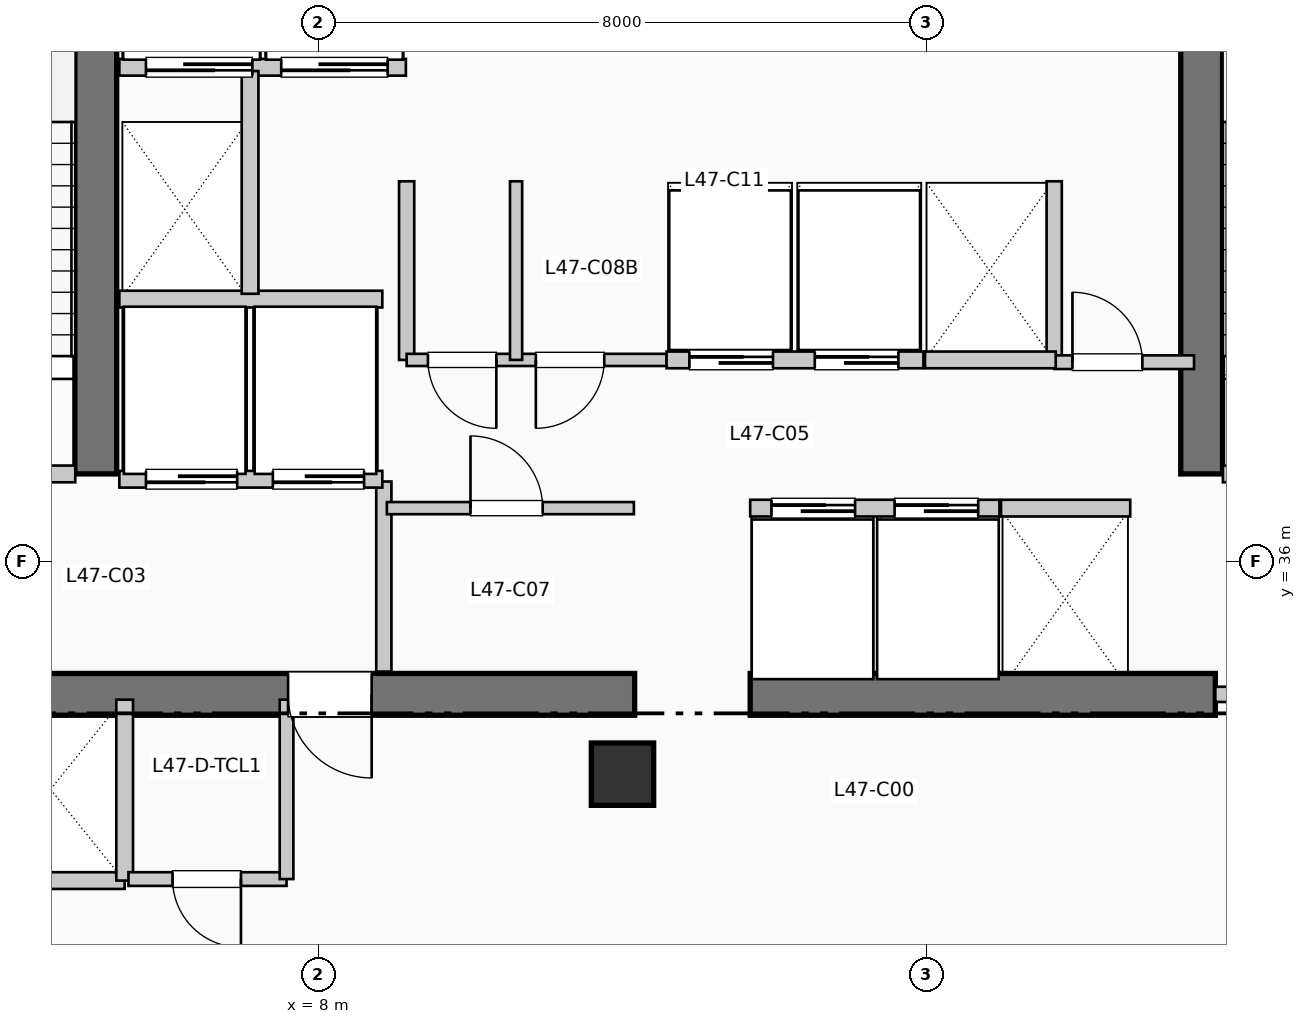
"""IFC4 building model, lengths in metres.
Left out: names, types, materials, properties, quantities, classifications, styles, units other than length and angle.
Written with IfcOpenShell. Run it as: python <this file> out.ifc"""

import sys

from ifc_helpers import new_model, si_unit, direction, frame, frame_2d, origin, origin_2d, place, context, subcontext, project, spatial, rectangle, extrude, element, fill, save


model = new_model("IFC4")
c1 = context("Model", 3, precision=1e-05, world=origin(), true_north=direction((0.0, 1.0)))
c2 = subcontext(c1, "Body", "Model", "MODEL_VIEW")
j1 = project(units=[si_unit("LENGTHUNIT", "METRE"), si_unit("PLANEANGLEUNIT", "RADIAN")], contexts=[c1])
p1 = place(None, origin())
s1 = spatial("IfcSite", under=j1, at=p1, CompositionType="ELEMENT")
p2 = place(p1, origin())
s2 = spatial("IfcBuilding", under=s1, at=p2, CompositionType="ELEMENT")
p3 = place(p2, frame((0.0, 0.0, 195.36)))
s3 = spatial("IfcBuildingStorey", under=s2, at=p3, CompositionType="ELEMENT", Elevation=195.36)
p4 = place(p3, frame((1.45, 34.25, 0.0), z_axis=(0.0, 0.0, 1.0), x_axis=(1.0, 0.0, 0.0)))
e1 = element("IfcWall", 1, at=p4, inside=s3, PredefinedType="SHEAR", context=c2, shape_type="SweptSolid", body=[
    extrude(rectangle(XDim=10.71, YDim=0.55, at=frame_2d((5.355, 0.0))), origin(), (0.0, 0.0, 1.0), 3.96),
])
p5 = place(p4, frame((7.25, 0.0, 0.0), z_axis=(0.0, 0.0, 1.0), x_axis=(-1.0, 0.0, 0.0)))
e2 = element("IfcOpeningElement", 2, at=p5, cuts=e1, PredefinedType="OPENING", context=c2, shape_type="SweptSolid", body=[
    extrude(rectangle(XDim=1.1, YDim=2.15, at=frame_2d((0.55, 1.075))), frame((0.0, 0.285, 0.0), z_axis=(0.0, -1.0, 0.0), x_axis=(1.0, 0.0, 0.0)), (0.0, 0.0, 1.0), 0.57),
])
p6 = place(p3, frame((13.68, 34.25, 0.0), z_axis=(0.0, 0.0, 1.0), x_axis=(1.0, 0.0, 0.0)))
e3 = element("IfcWall", 3, at=p6, inside=s3, PredefinedType="SHEAR", context=c2, shape_type="SweptSolid", body=[
    extrude(rectangle(XDim=6.12, YDim=0.55, at=frame_2d((3.06, 0.0))), origin(), (0.0, 0.0, 1.0), 3.96),
])
for number, where, z_axis, x_axis in (
    (4, (5.07, 37.15, 0.0), (0.0, 0.0, 1.0), (0.0, 1.0, 0.0)),
    (5, (19.62, 37.15, 0.0), (0.0, 0.0, 1.0), (0.0, 1.0, 0.0)),
):
    element("IfcWall", number, at=place(p3, frame(where, z_axis=z_axis, x_axis=x_axis)), inside=s3, PredefinedType="SHEAR", context=c2, shape_type="SweptSolid", body=[
        extrude(rectangle(XDim=7.89, YDim=0.55, at=frame_2d((3.945, 0.0))), origin(), (0.0, 0.0, 1.0), 3.96),
    ])
p7 = place(p3, frame((12.0, 33.2, 0.0), z_axis=(0.0, 0.0, 1.0), x_axis=(1.0, 0.0, 0.0)))
e6 = element("IfcColumn", 6, at=p7, inside=s3, PredefinedType="COLUMN", context=c2, shape_type="SweptSolid", body=[
    extrude(rectangle(XDim=0.82, YDim=0.82, at=origin_2d()), origin(), (0.0, 0.0, 1.0), 3.96),
])
p8 = place(p3, frame((1.65, 37.15, 0.0), z_axis=(0.0, 0.0, 1.0), x_axis=(1.0, 0.0, 0.0)))
e7 = element("IfcWall", 7, at=p8, inside=s3, PredefinedType="PARTITIONING", context=c2, shape_type="SweptSolid", body=[
    extrude(rectangle(XDim=3.15, YDim=0.22, at=frame_2d((1.575, 0.0))), origin(), (0.0, 0.0, 1.0), 3.71),
])
p9 = place(p8, frame((2.05, 0.0, 0.0), z_axis=(0.0, 0.0, 1.0), x_axis=(-1.0, 0.0, 0.0)))
e8 = element("IfcOpeningElement", 8, at=p9, cuts=e7, PredefinedType="OPENING", context=c2, shape_type="SweptSolid", body=[
    extrude(rectangle(XDim=1.05, YDim=2.15, at=frame_2d((0.525, 1.075))), frame((0.0, 0.12, 0.0), z_axis=(0.0, -1.0, 0.0), x_axis=(1.0, 0.0, 0.0)), (0.0, 0.0, 1.0), 0.24),
])
p10 = place(p3, frame((8.86, 34.55, 0.0), z_axis=(0.0, 0.0, 1.0), x_axis=(0.0, 1.0, 0.0)))
e9 = element("IfcWall", 9, at=p10, inside=s3, PredefinedType="PARTITIONING", context=c2, shape_type="SweptSolid", body=[
    extrude(rectangle(XDim=2.5, YDim=0.2, at=frame_2d((1.25, 0.0))), origin(), (0.0, 0.0, 1.0), 3.71),
])
p11 = place(p3, frame((19.9, 37.15, 0.0), z_axis=(0.0, 0.0, 1.0), x_axis=(1.0, 0.0, 0.0)))
e10 = element("IfcWall", 10, at=p11, inside=s3, PredefinedType="PARTITIONING", context=c2, shape_type="SweptSolid", body=[
    extrude(rectangle(XDim=3.15, YDim=0.22, at=frame_2d((1.575, 0.0))), origin(), (0.0, 0.0, 1.0), 3.71),
])
p12 = place(p11, frame((2.05, 0.0, 0.0), z_axis=(0.0, 0.0, 1.0), x_axis=(-1.0, 0.0, 0.0)))
e11 = element("IfcOpeningElement", 11, at=p12, cuts=e10, PredefinedType="OPENING", context=c2, shape_type="SweptSolid", body=[
    extrude(rectangle(XDim=1.05, YDim=2.15, at=frame_2d((0.525, 1.075))), frame((0.0, 0.12, 0.0), z_axis=(0.0, -1.0, 0.0), x_axis=(1.0, 0.0, 0.0)), (0.0, 0.0, 1.0), 0.24),
])
p13 = place(p3, frame((19.8, 34.25, 0.0), z_axis=(0.0, 0.0, 1.0), x_axis=(1.0, 0.0, 0.0)))
e12 = element("IfcWall", 12, at=p13, inside=s3, PredefinedType="PARTITIONING", context=c2, shape_type="SweptSolid", body=[
    extrude(rectangle(XDim=3.25, YDim=0.2, at=frame_2d((1.625, 0.0))), origin(), (0.0, 0.0, 1.0), 3.71),
])
p14 = place(p13, frame((2.15, 0.0, 0.0), z_axis=(0.0, 0.0, 1.0), x_axis=(-1.0, 0.0, 0.0)))
e13 = element("IfcOpeningElement", 13, at=p14, cuts=e12, PredefinedType="OPENING", context=c2, shape_type="SweptSolid", body=[
    extrude(rectangle(XDim=1.1, YDim=2.15, at=frame_2d((0.55, 1.075))), frame((0.0, 0.11, 0.0), z_axis=(0.0, -1.0, 0.0), x_axis=(1.0, 0.0, 0.0)), (0.0, 0.0, 1.0), 0.22),
])
p15 = place(p3, frame((5.38, 37.08, 0.0), z_axis=(0.0, 0.0, 1.0), x_axis=(1.0, 0.0, 0.0)))
e14 = element("IfcWall", 14, at=p15, inside=s3, PredefinedType="PARTITIONING", context=c2, shape_type="SweptSolid", body=[
    extrude(rectangle(XDim=3.46, YDim=0.22, at=frame_2d((1.73, 0.0))), origin(), (0.0, 0.0, 1.0), 3.71),
])
p16 = place(p15, frame((1.55, 0.0, 0.0), z_axis=(0.0, 0.0, 1.0), x_axis=(-1.0, 0.0, 0.0)))
e15 = element("IfcOpeningElement", 15, at=p16, cuts=e14, PredefinedType="OPENING", context=c2, shape_type="SweptSolid", body=[
    extrude(rectangle(XDim=1.2, YDim=2.2, at=frame_2d((0.6, 1.1))), frame((0.0, 0.12, 0.0), z_axis=(0.0, -1.0, 0.0), x_axis=(1.0, 0.0, 0.0)), (0.0, 0.0, 1.0), 0.24),
])
p17 = place(p15, frame((3.22, 0.0, 0.0), z_axis=(0.0, 0.0, 1.0), x_axis=(-1.0, 0.0, 0.0)))
e16 = element("IfcOpeningElement", 16, at=p17, cuts=e14, PredefinedType="OPENING", context=c2, shape_type="SweptSolid", body=[
    extrude(rectangle(XDim=1.2, YDim=2.2, at=frame_2d((0.6, 1.1))), frame((0.0, 0.12, 0.0), z_axis=(0.0, -1.0, 0.0), x_axis=(1.0, 0.0, 0.0)), (0.0, 0.0, 1.0), 0.24),
])
p18 = place(p3, frame((5.38, 39.45, 0.0), z_axis=(0.0, 0.0, 1.0), x_axis=(1.0, 0.0, 0.0)))
e17 = element("IfcWall", 17, at=p18, inside=s3, PredefinedType="PARTITIONING", context=c2, shape_type="SweptSolid", body=[
    extrude(rectangle(XDim=3.46, YDim=0.22, at=frame_2d((1.73, 0.0))), origin(), (0.0, 0.0, 1.0), 3.71),
])
p19 = place(p3, frame((5.38, 42.5, 0.0), z_axis=(0.0, 0.0, 1.0), x_axis=(1.0, 0.0, 0.0)))
e18 = element("IfcWall", 18, at=p19, inside=s3, PredefinedType="PARTITIONING", context=c2, shape_type="SweptSolid", body=[
    extrude(rectangle(XDim=3.77, YDim=0.22, at=frame_2d((1.885, 0.0))), origin(), (0.0, 0.0, 1.0), 3.71),
])
p20 = place(p19, frame((1.75, 0.0, 0.0), z_axis=(0.0, 0.0, 1.0), x_axis=(-1.0, 0.0, 0.0)))
e19 = element("IfcOpeningElement", 19, at=p20, cuts=e18, PredefinedType="OPENING", context=c2, shape_type="SweptSolid", body=[
    extrude(rectangle(XDim=1.4, YDim=2.2, at=frame_2d((0.7, 1.1))), frame((0.0, 0.12, 0.0), z_axis=(0.0, -1.0, 0.0), x_axis=(1.0, 0.0, 0.0)), (0.0, 0.0, 1.0), 0.24),
])
p21 = place(p19, frame((3.53, 0.0, 0.0), z_axis=(0.0, 0.0, 1.0), x_axis=(-1.0, 0.0, 0.0)))
e20 = element("IfcOpeningElement", 20, at=p21, cuts=e18, PredefinedType="OPENING", context=c2, shape_type="SweptSolid", body=[
    extrude(rectangle(XDim=1.4, YDim=2.2, at=frame_2d((0.7, 1.1))), frame((0.0, 0.12, 0.0), z_axis=(0.0, -1.0, 0.0), x_axis=(1.0, 0.0, 0.0)), (0.0, 0.0, 1.0), 0.24),
])
p22 = place(p3, frame((7.1, 39.52, 0.0), z_axis=(0.0, 0.0, 1.0), x_axis=(0.0, 1.0, 0.0)))
e21 = element("IfcWall", 21, at=p22, inside=s3, PredefinedType="PARTITIONING", context=c2, shape_type="SweptSolid", body=[
    extrude(rectangle(XDim=2.93, YDim=0.22, at=frame_2d((1.465, 0.0))), origin(), (0.0, 0.0, 1.0), 3.71),
])
p23 = place(p3, frame((1.55, 31.8, 0.0), z_axis=(0.0, 0.0, 1.0), x_axis=(1.0, 0.0, 0.0)))
e22 = element("IfcWall", 22, at=p23, inside=s3, PredefinedType="PARTITIONING", context=c2, shape_type="SweptSolid", body=[
    extrude(rectangle(XDim=3.9, YDim=0.22, at=frame_2d((1.95, 0.0))), origin(), (0.0, 0.0, 1.0), 3.71),
])
p24 = place(p3, frame((5.45, 31.8, 0.0), z_axis=(0.0, 0.0, 1.0), x_axis=(0.0, 1.0, 0.0)))
e23 = element("IfcWall", 23, at=p24, inside=s3, PredefinedType="PARTITIONING", context=c2, shape_type="SweptSolid", body=[
    extrude(rectangle(XDim=2.38, YDim=0.22, at=frame_2d((1.19, 0.0))), origin(), (0.0, 0.0, 1.0), 3.71),
])
for number, where, z_axis, x_axis in (
    (24, (9.16, 38.65, 0.0), (0.0, 0.0, 1.0), (0.0, 1.0, 0.0)),
    (25, (17.68, 38.65, 0.0), (0.0, 0.0, 1.0), (0.0, 1.0, 0.0)),
):
    element("IfcWall", number, at=place(p3, frame(where, z_axis=z_axis, x_axis=x_axis)), inside=s3, PredefinedType="PARTITIONING", context=c2, shape_type="SweptSolid", body=[
        extrude(rectangle(XDim=2.35, YDim=0.2, at=frame_2d((1.175, 0.0))), origin(), (0.0, 0.0, 1.0), 3.71),
    ])
p25 = place(p3, frame((17.68, 38.62, 0.0), z_axis=(0.0, 0.0, 1.0), x_axis=(1.0, 0.0, 0.0)))
e26 = element("IfcWall", 26, at=p25, inside=s3, PredefinedType="PARTITIONING", context=c2, shape_type="SweptSolid", body=[
    extrude(rectangle(XDim=1.84, YDim=0.18, at=frame_2d((0.92, 0.0))), origin(), (0.0, 0.0, 1.0), 3.71),
])
p26 = place(p25, frame((0.24, 0.0, 0.0)))
e27 = element("IfcOpeningElement", 27, at=p26, cuts=e26, PredefinedType="OPENING", context=c2, shape_type="SweptSolid", body=[
    extrude(rectangle(XDim=0.92, YDim=2.1, at=frame_2d((0.46, 1.05))), frame((0.0, 0.1, 0.0), z_axis=(0.0, -1.0, 0.0), x_axis=(1.0, 0.0, 0.0)), (0.0, 0.0, 1.0), 0.2),
])
p27 = place(p3, frame((5.5, 31.82, 0.0), z_axis=(0.0, 0.0, 1.0), x_axis=(1.0, 0.0, 0.0)))
e28 = element("IfcWall", 28, at=p27, inside=s3, PredefinedType="PLUMBINGWALL", context=c2, shape_type="SweptSolid", body=[
    extrude(rectangle(XDim=2.08, YDim=0.18, at=frame_2d((1.04, 0.0))), origin(), (0.0, 0.0, 1.0), 3.71),
])
p28 = place(p27, frame((1.48, 0.0, 0.0), z_axis=(0.0, 0.0, 1.0), x_axis=(-1.0, 0.0, 0.0)))
e29 = element("IfcOpeningElement", 29, at=p28, cuts=e28, PredefinedType="OPENING", context=c2, shape_type="SweptSolid", body=[
    extrude(rectangle(XDim=0.9, YDim=2.1, at=frame_2d((0.45, 1.05))), frame((0.0, 0.1, 0.0), z_axis=(0.0, -1.0, 0.0), x_axis=(1.0, 0.0, 0.0)), (0.0, 0.0, 1.0), 0.2),
])
p29 = place(p3, frame((7.58, 31.82, 0.0), z_axis=(0.0, 0.0, 1.0), x_axis=(0.0, 1.0, 0.0)))
e30 = element("IfcWall", 30, at=p29, inside=s3, PredefinedType="PLUMBINGWALL", context=c2, shape_type="SweptSolid", body=[
    extrude(rectangle(XDim=2.36, YDim=0.18, at=frame_2d((1.18, 0.0))), origin(), (0.0, 0.0, 1.0), 3.71),
])
p30 = place(p3, frame((8.9, 36.7, 0.0), z_axis=(0.0, 0.0, 1.0), x_axis=(1.0, 0.0, 0.0)))
e31 = element("IfcWall", 31, at=p30, inside=s3, PredefinedType="PARTITIONING", context=c2, shape_type="SweptSolid", body=[
    extrude(rectangle(XDim=3.25, YDim=0.16, at=frame_2d((1.625, 0.0))), origin(), (0.0, 0.0, 1.0), 3.71),
])
p31 = place(p30, frame((1.1, 0.0, 0.0)))
e32 = element("IfcOpeningElement", 32, at=p31, cuts=e31, PredefinedType="OPENING", context=c2, shape_type="SweptSolid", body=[
    extrude(rectangle(XDim=0.95, YDim=2.15, at=frame_2d((0.475, 1.075))), frame((0.0, 0.09, 0.0), z_axis=(0.0, -1.0, 0.0), x_axis=(1.0, 0.0, 0.0)), (0.0, 0.0, 1.0), 0.18),
])
p32 = place(p3, frame((9.16, 38.65, 0.0), z_axis=(0.0, 0.0, 1.0), x_axis=(1.0, 0.0, 0.0)))
e33 = element("IfcWall", 33, at=p32, inside=s3, PredefinedType="PARTITIONING", context=c2, shape_type="SweptSolid", body=[
    extrude(rectangle(XDim=3.42, YDim=0.16, at=frame_2d((1.71, 0.0))), origin(), (0.0, 0.0, 1.0), 3.71),
])
p33 = place(p32, frame((1.18, 0.0, 0.0), z_axis=(0.0, 0.0, 1.0), x_axis=(-1.0, 0.0, 0.0)))
e34 = element("IfcOpeningElement", 34, at=p33, cuts=e33, PredefinedType="OPENING", context=c2, shape_type="SweptSolid", body=[
    extrude(rectangle(XDim=0.9, YDim=2.15, at=frame_2d((0.45, 1.075))), frame((0.0, 0.09, 0.0), z_axis=(0.0, -1.0, 0.0), x_axis=(1.0, 0.0, 0.0)), (0.0, 0.0, 1.0), 0.18),
])
p34 = place(p32, frame((2.6, 0.0, 0.0), z_axis=(0.0, 0.0, 1.0), x_axis=(-1.0, 0.0, 0.0)))
e35 = element("IfcOpeningElement", 35, at=p34, cuts=e33, PredefinedType="OPENING", context=c2, shape_type="SweptSolid", body=[
    extrude(rectangle(XDim=0.9, YDim=2.15, at=frame_2d((0.45, 1.075))), frame((0.0, 0.09, 0.0), z_axis=(0.0, -1.0, 0.0), x_axis=(1.0, 0.0, 0.0)), (0.0, 0.0, 1.0), 0.18),
])
p35 = place(p3, frame((10.6, 38.65, 0.0), z_axis=(0.0, 0.0, 1.0), x_axis=(0.0, 1.0, 0.0)))
e36 = element("IfcWall", 36, at=p35, inside=s3, PredefinedType="PARTITIONING", context=c2, shape_type="SweptSolid", body=[
    extrude(rectangle(XDim=2.35, YDim=0.16, at=frame_2d((1.175, 0.0))), origin(), (0.0, 0.0, 1.0), 3.71),
])
p36 = place(p3, frame((13.68, 36.7, 0.0), z_axis=(0.0, 0.0, 1.0), x_axis=(1.0, 0.0, 0.0)))
e37 = element("IfcWall", 37, at=p36, inside=s3, PredefinedType="PARTITIONING", context=c2, shape_type="SweptSolid", body=[
    extrude(rectangle(XDim=3.28, YDim=0.22, at=frame_2d((1.64, 0.0))), origin(), (0.0, 0.0, 1.0), 3.71),
])
p37 = place(p36, frame((0.28, 0.0, 0.0)))
e38 = element("IfcOpeningElement", 38, at=p37, cuts=e37, PredefinedType="OPENING", context=c2, shape_type="SweptSolid", body=[
    extrude(rectangle(XDim=1.1, YDim=2.2, at=frame_2d((0.55, 1.1))), frame((0.0, 0.12, 0.0), z_axis=(0.0, -1.0, 0.0), x_axis=(1.0, 0.0, 0.0)), (0.0, 0.0, 1.0), 0.24),
])
p38 = place(p36, frame((1.9, 0.0, 0.0)))
e39 = element("IfcOpeningElement", 39, at=p38, cuts=e37, PredefinedType="OPENING", context=c2, shape_type="SweptSolid", body=[
    extrude(rectangle(XDim=1.1, YDim=2.2, at=frame_2d((0.55, 1.1))), frame((0.0, 0.12, 0.0), z_axis=(0.0, -1.0, 0.0), x_axis=(1.0, 0.0, 0.0)), (0.0, 0.0, 1.0), 0.24),
])
p39 = place(p3, frame((12.58, 38.65, 0.0), z_axis=(0.0, 0.0, 1.0), x_axis=(1.0, 0.0, 0.0)))
e40 = element("IfcWall", 40, at=p39, inside=s3, PredefinedType="PARTITIONING", context=c2, shape_type="SweptSolid", body=[
    extrude(rectangle(XDim=3.38, YDim=0.22, at=frame_2d((1.69, 0.0))), origin(), (0.0, 0.0, 1.0), 3.71),
])
p40 = place(p39, frame((0.3, 0.0, 0.0)))
e41 = element("IfcOpeningElement", 41, at=p40, cuts=e40, PredefinedType="OPENING", context=c2, shape_type="SweptSolid", body=[
    extrude(rectangle(XDim=1.1, YDim=2.2, at=frame_2d((0.55, 1.1))), frame((0.0, 0.12, 0.0), z_axis=(0.0, -1.0, 0.0), x_axis=(1.0, 0.0, 0.0)), (0.0, 0.0, 1.0), 0.24),
])
p41 = place(p39, frame((1.95, 0.0, 0.0)))
e42 = element("IfcOpeningElement", 42, at=p41, cuts=e40, PredefinedType="OPENING", context=c2, shape_type="SweptSolid", body=[
    extrude(rectangle(XDim=1.1, YDim=2.2, at=frame_2d((0.55, 1.1))), frame((0.0, 0.12, 0.0), z_axis=(0.0, -1.0, 0.0), x_axis=(1.0, 0.0, 0.0)), (0.0, 0.0, 1.0), 0.24),
])
p42 = place(p3, frame((16.98, 36.7, 0.0), z_axis=(0.0, 0.0, 1.0), x_axis=(1.0, 0.0, 0.0)))
e43 = element("IfcWall", 43, at=p42, inside=s3, PredefinedType="PARTITIONING", context=c2, shape_type="SweptSolid", body=[
    extrude(rectangle(XDim=1.7, YDim=0.22, at=frame_2d((0.85, 0.0))), origin(), (0.0, 0.0, 1.0), 3.71),
])
p43 = place(p3, frame((15.98, 38.65, 0.0), z_axis=(0.0, 0.0, 1.0), x_axis=(1.0, 0.0, 0.0)))
e44 = element("IfcWall", 44, at=p43, inside=s3, PredefinedType="PARTITIONING", context=c2, shape_type="SweptSolid", body=[
    extrude(rectangle(XDim=1.72, YDim=0.22, at=frame_2d((0.86, 0.0))), origin(), (0.0, 0.0, 1.0), 3.71),
])
p44 = place(p5, origin())
e45 = element("IfcDoor", 45, at=p44, inside=s3, OperationType="SINGLE_SWING_RIGHT", PredefinedType="DOOR", context=c2, shape_type="SweptSolid", body=[
    extrude(rectangle(XDim=1.1, YDim=2.15, at=frame_2d((0.55, 1.075))), frame((0.0, 0.025, 0.0), z_axis=(0.0, -1.0, 0.0), x_axis=(1.0, 0.0, 0.0)), (0.0, 0.0, 1.0), 0.05),
])
fill(e2, e45)
p45 = place(p16, origin())
e46 = element("IfcDoor", 46, at=p45, inside=s3, OperationType="SLIDING_TO_RIGHT", PredefinedType="DOOR", context=c2, shape_type="SweptSolid", body=[
    extrude(rectangle(XDim=1.2, YDim=2.2, at=frame_2d((0.6, 1.1))), frame((0.0, 0.025, 0.0), z_axis=(0.0, -1.0, 0.0), x_axis=(1.0, 0.0, 0.0)), (0.0, 0.0, 1.0), 0.05),
])
fill(e15, e46)
p46 = place(p17, origin())
e47 = element("IfcDoor", 47, at=p46, inside=s3, OperationType="SLIDING_TO_RIGHT", PredefinedType="DOOR", context=c2, shape_type="SweptSolid", body=[
    extrude(rectangle(XDim=1.2, YDim=2.2, at=frame_2d((0.6, 1.1))), frame((0.0, 0.025, 0.0), z_axis=(0.0, -1.0, 0.0), x_axis=(1.0, 0.0, 0.0)), (0.0, 0.0, 1.0), 0.05),
])
fill(e16, e47)
p47 = place(p20, origin())
e48 = element("IfcDoor", 48, at=p47, inside=s3, OperationType="SLIDING_TO_LEFT", PredefinedType="DOOR", context=c2, shape_type="SweptSolid", body=[
    extrude(rectangle(XDim=1.4, YDim=2.2, at=frame_2d((0.7, 1.1))), frame((0.0, 0.025, 0.0), z_axis=(0.0, -1.0, 0.0), x_axis=(1.0, 0.0, 0.0)), (0.0, 0.0, 1.0), 0.05),
])
fill(e19, e48)
p48 = place(p21, origin())
e49 = element("IfcDoor", 49, at=p48, inside=s3, OperationType="SLIDING_TO_LEFT", PredefinedType="DOOR", context=c2, shape_type="SweptSolid", body=[
    extrude(rectangle(XDim=1.4, YDim=2.2, at=frame_2d((0.7, 1.1))), frame((0.0, 0.025, 0.0), z_axis=(0.0, -1.0, 0.0), x_axis=(1.0, 0.0, 0.0)), (0.0, 0.0, 1.0), 0.05),
])
fill(e20, e49)
p49 = place(p26, origin())
e50 = element("IfcDoor", 50, at=p49, inside=s3, OperationType="SINGLE_SWING_LEFT", PredefinedType="DOOR", context=c2, shape_type="SweptSolid", body=[
    extrude(rectangle(XDim=0.92, YDim=2.1, at=frame_2d((0.46, 1.05))), frame((0.0, 0.025, 0.0), z_axis=(0.0, -1.0, 0.0), x_axis=(1.0, 0.0, 0.0)), (0.0, 0.0, 1.0), 0.05),
])
fill(e27, e50)
p50 = place(p28, origin())
e51 = element("IfcDoor", 51, at=p50, inside=s3, OperationType="SINGLE_SWING_RIGHT", PredefinedType="DOOR", context=c2, shape_type="SweptSolid", body=[
    extrude(rectangle(XDim=0.9, YDim=2.1, at=frame_2d((0.45, 1.05))), frame((0.0, 0.025, 0.0), z_axis=(0.0, -1.0, 0.0), x_axis=(1.0, 0.0, 0.0)), (0.0, 0.0, 1.0), 0.05),
])
fill(e29, e51)
p51 = place(p31, origin())
e52 = element("IfcDoor", 52, at=p51, inside=s3, OperationType="SINGLE_SWING_LEFT", PredefinedType="DOOR", context=c2, shape_type="SweptSolid", body=[
    extrude(rectangle(XDim=0.95, YDim=2.15, at=frame_2d((0.475, 1.075))), frame((0.0, 0.025, 0.0), z_axis=(0.0, -1.0, 0.0), x_axis=(1.0, 0.0, 0.0)), (0.0, 0.0, 1.0), 0.05),
])
fill(e32, e52)
p52 = place(p33, origin())
e53 = element("IfcDoor", 53, at=p52, inside=s3, OperationType="SINGLE_SWING_RIGHT", PredefinedType="DOOR", context=c2, shape_type="SweptSolid", body=[
    extrude(rectangle(XDim=0.9, YDim=2.15, at=frame_2d((0.45, 1.075))), frame((0.0, 0.025, 0.0), z_axis=(0.0, -1.0, 0.0), x_axis=(1.0, 0.0, 0.0)), (0.0, 0.0, 1.0), 0.05),
])
fill(e34, e53)
p53 = place(p34, origin())
e54 = element("IfcDoor", 54, at=p53, inside=s3, OperationType="SINGLE_SWING_LEFT", PredefinedType="DOOR", context=c2, shape_type="SweptSolid", body=[
    extrude(rectangle(XDim=0.9, YDim=2.15, at=frame_2d((0.45, 1.075))), frame((0.0, 0.025, 0.0), z_axis=(0.0, -1.0, 0.0), x_axis=(1.0, 0.0, 0.0)), (0.0, 0.0, 1.0), 0.05),
])
fill(e35, e54)
p54 = place(p37, origin())
e55 = element("IfcDoor", 55, at=p54, inside=s3, OperationType="SLIDING_TO_RIGHT", PredefinedType="DOOR", context=c2, shape_type="SweptSolid", body=[
    extrude(rectangle(XDim=1.1, YDim=2.2, at=frame_2d((0.55, 1.1))), frame((0.0, 0.025, 0.0), z_axis=(0.0, -1.0, 0.0), x_axis=(1.0, 0.0, 0.0)), (0.0, 0.0, 1.0), 0.05),
])
fill(e38, e55)
p55 = place(p38, origin())
e56 = element("IfcDoor", 56, at=p55, inside=s3, OperationType="SLIDING_TO_RIGHT", PredefinedType="DOOR", context=c2, shape_type="SweptSolid", body=[
    extrude(rectangle(XDim=1.1, YDim=2.2, at=frame_2d((0.55, 1.1))), frame((0.0, 0.025, 0.0), z_axis=(0.0, -1.0, 0.0), x_axis=(1.0, 0.0, 0.0)), (0.0, 0.0, 1.0), 0.05),
])
fill(e39, e56)
p56 = place(p40, origin())
e57 = element("IfcDoor", 57, at=p56, inside=s3, OperationType="SLIDING_TO_RIGHT", PredefinedType="DOOR", context=c2, shape_type="SweptSolid", body=[
    extrude(rectangle(XDim=1.1, YDim=2.2, at=frame_2d((0.55, 1.1))), frame((0.0, 0.025, 0.0), z_axis=(0.0, -1.0, 0.0), x_axis=(1.0, 0.0, 0.0)), (0.0, 0.0, 1.0), 0.05),
])
fill(e41, e57)
p57 = place(p41, origin())
e58 = element("IfcDoor", 58, at=p57, inside=s3, OperationType="SLIDING_TO_RIGHT", PredefinedType="DOOR", context=c2, shape_type="SweptSolid", body=[
    extrude(rectangle(XDim=1.1, YDim=2.2, at=frame_2d((0.55, 1.1))), frame((0.0, 0.025, 0.0), z_axis=(0.0, -1.0, 0.0), x_axis=(1.0, 0.0, 0.0)), (0.0, 0.0, 1.0), 0.05),
])
fill(e42, e58)
save(model, sys.argv[1])
